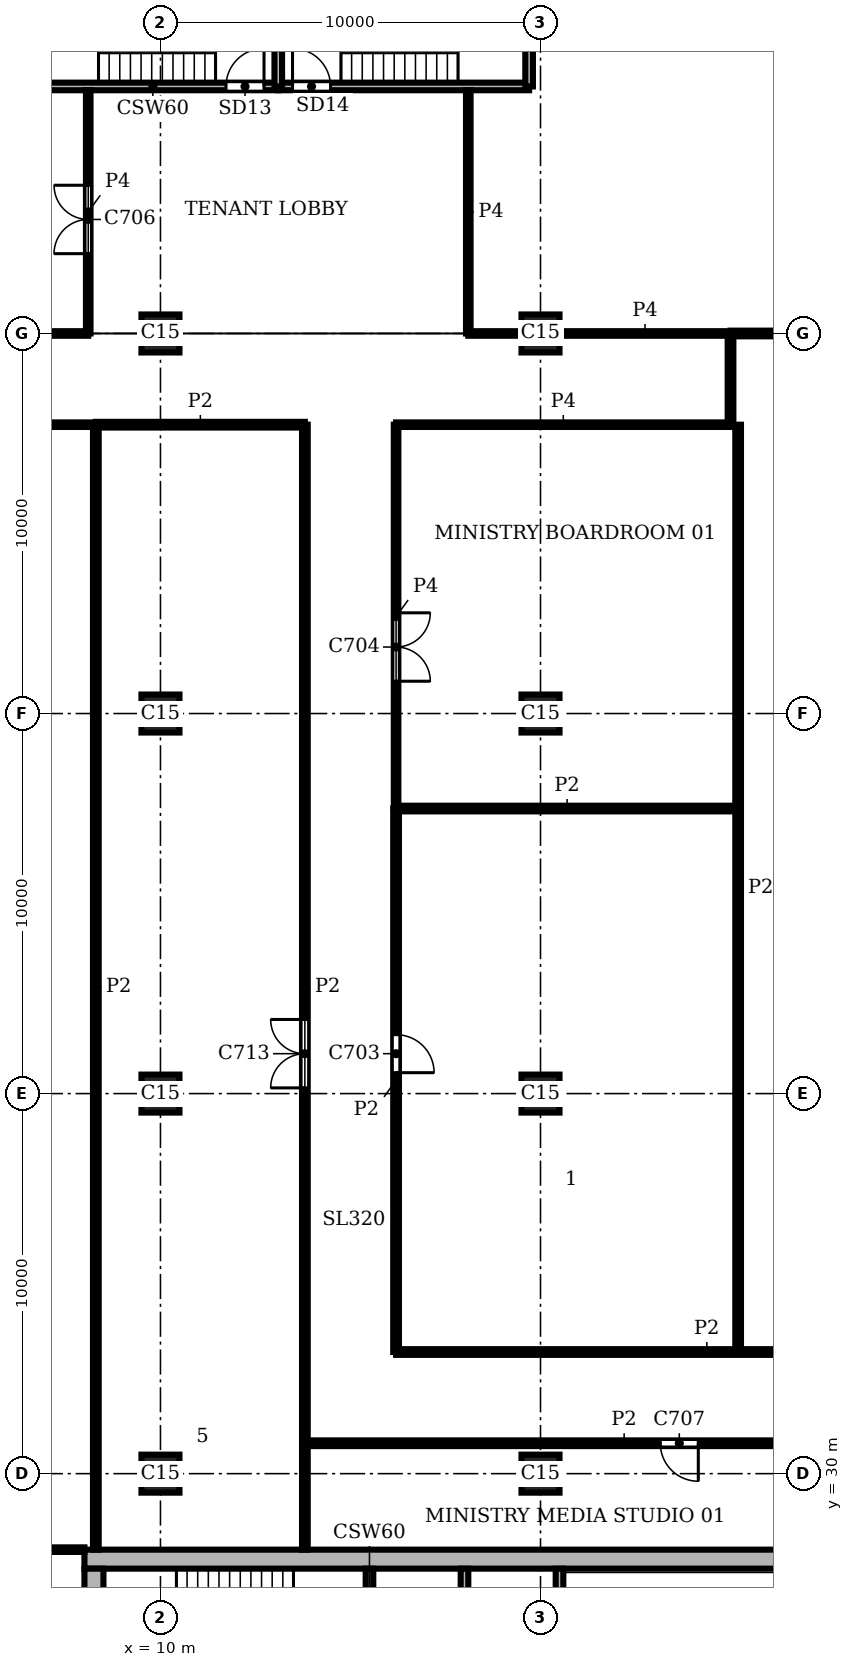
"""IFC4 building model, lengths in metres.
Left out: names, types, materials, properties, quantities, classifications, styles, units other than length and angle.
Written with IfcOpenShell. Run it as: python <this file> out.ifc"""

import sys

from ifc_helpers import new_model, si_unit, direction, frame, frame_2d, origin, origin_2d, place, context, subcontext, project, spatial, rectangle, extrude, element, fill, save


model = new_model("IFC4")
c1 = context("Model", 3, precision=1e-05, world=origin(), true_north=direction((0.0, 1.0)))
c2 = subcontext(c1, "Body", "Model", "MODEL_VIEW")
j1 = project(units=[si_unit("LENGTHUNIT", "METRE"), si_unit("PLANEANGLEUNIT", "RADIAN")], contexts=[c1])
p1 = place(None, origin())
s1 = spatial("IfcSite", under=j1, at=p1, CompositionType="ELEMENT")
p2 = place(p1, origin())
s2 = spatial("IfcBuilding", under=s1, at=p2, CompositionType="ELEMENT")
p3 = place(p2, frame((0.0, 0.0, 309.9)))
s3 = spatial("IfcBuildingStorey", under=s2, at=p3, CompositionType="ELEMENT", Elevation=309.9)
for number, where, z_axis, x_axis in (
    (1, (10.0, 30.0, 0.0), (0.0, 0.0, 1.0), (1.0, 0.0, 0.0)),
    (2, (10.0, 40.0, 0.0), (0.0, 0.0, 1.0), (1.0, 0.0, 0.0)),
    (3, (10.0, 50.0, 0.0), (0.0, 0.0, 1.0), (1.0, 0.0, 0.0)),
    (4, (10.0, 60.0, 0.0), (0.0, 0.0, 1.0), (1.0, 0.0, 0.0)),
    (5, (20.0, 30.0, 0.0), (0.0, 0.0, 1.0), (1.0, 0.0, 0.0)),
    (6, (20.0, 40.0, 0.0), (0.0, 0.0, 1.0), (1.0, 0.0, 0.0)),
    (7, (20.0, 50.0, 0.0), (0.0, 0.0, 1.0), (1.0, 0.0, 0.0)),
    (8, (20.0, 60.0, 0.0), (0.0, 0.0, 1.0), (1.0, 0.0, 0.0)),
):
    element("IfcColumn", number, at=place(p3, frame(where, z_axis=z_axis, x_axis=x_axis)), inside=s3, PredefinedType="COLUMN", context=c2, shape_type="SweptSolid", body=[
        extrude(rectangle(XDim=1.0, YDim=1.0, at=origin_2d()), origin(), (0.0, 0.0, 1.0), 3.9),
    ])
p4 = place(p3, frame((28.0, 27.75, 0.0), z_axis=(0.0, 0.0, 1.0), x_axis=(-1.0, 0.0, 0.0)))
e9 = element("IfcWall", 9, at=p4, inside=s3, PredefinedType="SHEAR", context=c2, shape_type="SweptSolid", body=[
    extrude(rectangle(XDim=20.0, YDim=0.5, at=frame_2d((10.0, 0.0))), origin(), (0.0, 0.0, 1.0), 3.9),
])
p5 = place(p3, frame((8.25, 27.5, 0.0), z_axis=(0.0, 0.0, 1.0), x_axis=(0.0, -1.0, 0.0)))
e10 = element("IfcWall", 10, at=p5, inside=s3, PredefinedType="SHEAR", context=c2, shape_type="SweptSolid", body=[
    extrude(rectangle(XDim=19.0, YDim=0.5, at=frame_2d((9.5, 0.0))), origin(), (0.0, 0.0, 1.0), 3.9),
])
p6 = place(p3, frame((6.5, 66.5, 0.0), z_axis=(0.0, 0.0, 1.0), x_axis=(1.0, 0.0, 0.0)))
e11 = element("IfcWall", 11, at=p6, inside=s3, PredefinedType="SHEAR", context=c2, shape_type="SweptSolid", body=[
    extrude(rectangle(XDim=6.6, YDim=0.2, at=frame_2d((3.3, 0.0))), origin(), (0.0, 0.0, 1.0), 3.58),
])
p7 = place(p6, frame((5.225, 0.0, 0.0)))
e12 = element("IfcOpeningElement", 12, at=p7, cuts=e11, PredefinedType="OPENING", context=c2, shape_type="SweptSolid", body=[
    extrude(rectangle(XDim=1.0, YDim=2.1, at=frame_2d((0.5, 1.05))), frame((0.0, 0.11, 0.0), z_axis=(0.0, -1.0, 0.0), x_axis=(1.0, 0.0, 0.0)), (0.0, 0.0, 1.0), 0.22),
])
p8 = place(p3, frame((13.1, 66.5, 0.0), z_axis=(0.0, 0.0, 1.0), x_axis=(1.0, 0.0, 0.0)))
e13 = element("IfcWall", 13, at=p8, inside=s3, PredefinedType="SHEAR", context=c2, shape_type="SweptSolid", body=[
    extrude(rectangle(XDim=6.6, YDim=0.2, at=frame_2d((3.3, 0.0))), origin(), (0.0, 0.0, 1.0), 3.58),
])
p9 = place(p8, frame((0.375, 0.0, 0.0)))
e14 = element("IfcOpeningElement", 14, at=p9, cuts=e13, PredefinedType="OPENING", context=c2, shape_type="SweptSolid", body=[
    extrude(rectangle(XDim=1.0, YDim=2.1, at=frame_2d((0.5, 1.05))), frame((0.0, 0.11, 0.0), z_axis=(0.0, -1.0, 0.0), x_axis=(1.0, 0.0, 0.0)), (0.0, 0.0, 1.0), 0.22),
])
p10 = place(p3, frame((13.1, 66.5, 0.0), z_axis=(0.0, 0.0, 1.0), x_axis=(0.0, 1.0, 0.0)))
e15 = element("IfcWall", 15, at=p10, inside=s3, PredefinedType="SHEAR", context=c2, shape_type="SweptSolid", body=[
    extrude(rectangle(XDim=3.3, YDim=0.2, at=frame_2d((1.65, 0.0))), origin(), (0.0, 0.0, 1.0), 3.58),
])
p11 = place(p3, frame((15.5, 23.6, 0.0), z_axis=(0.0, 0.0, 1.0), x_axis=(0.0, 1.0, 0.0)))
e16 = element("IfcWall", 16, at=p11, inside=s3, PredefinedType="SHEAR", context=c2, shape_type="SweptSolid", body=[
    extrude(rectangle(XDim=3.9, YDim=0.2, at=frame_2d((1.95, 0.0))), origin(), (0.0, 0.0, 1.0), 3.58),
])
p12 = place(p3, frame((18.0, 20.0, 0.0), z_axis=(0.0, 0.0, 1.0), x_axis=(0.0, 1.0, 0.0)))
e17 = element("IfcWall", 17, at=p12, inside=s3, PredefinedType="SHEAR", context=c2, shape_type="SweptSolid", body=[
    extrude(rectangle(XDim=7.5, YDim=0.2, at=frame_2d((3.75, 0.0))), origin(), (0.0, 0.0, 1.0), 3.58),
])
p13 = place(p12, frame((1.2, 0.0, 0.0)))
e18 = element("IfcOpeningElement", 18, at=p13, cuts=e17, PredefinedType="OPENING", context=c2, shape_type="SweptSolid", body=[
    extrude(rectangle(XDim=1.2, YDim=2.1, at=frame_2d((0.6, 1.05))), frame((0.0, 0.11, 0.0), z_axis=(0.0, -1.0, 0.0), x_axis=(1.0, 0.0, 0.0)), (0.0, 0.0, 1.0), 0.22),
])
p14 = place(p3, frame((19.7, 66.5, 0.0), z_axis=(0.0, 0.0, 1.0), x_axis=(0.0, 1.0, 0.0)))
e19 = element("IfcWall", 19, at=p14, inside=s3, PredefinedType="SHEAR", context=c2, shape_type="SweptSolid", body=[
    extrude(rectangle(XDim=3.3, YDim=0.2, at=frame_2d((1.65, 0.0))), origin(), (0.0, 0.0, 1.0), 3.58),
])
p15 = place(p3, frame((20.5, 23.6, 0.0), z_axis=(0.0, 0.0, 1.0), x_axis=(0.0, 1.0, 0.0)))
e20 = element("IfcWall", 20, at=p15, inside=s3, PredefinedType="SHEAR", context=c2, shape_type="SweptSolid", body=[
    extrude(rectangle(XDim=3.9, YDim=0.2, at=frame_2d((1.95, 0.0))), origin(), (0.0, 0.0, 1.0), 3.58),
])
p16 = place(p3, frame((8.3, 28.0, 0.0), z_axis=(0.0, 0.0, 1.0), x_axis=(0.0, 1.0, 0.0)))
e21 = element("IfcWall", 21, at=p16, inside=s3, PredefinedType="PARTITIONING", context=c2, shape_type="SweptSolid", body=[
    extrude(rectangle(XDim=29.6, YDim=0.15, at=frame_2d((14.8, 0.0))), origin(), (0.0, 0.0, 1.0), 3.58),
])
p17 = place(p3, frame((13.8, 28.0, 0.0), z_axis=(0.0, 0.0, 1.0), x_axis=(0.0, 1.0, 0.0)))
e22 = element("IfcWall", 22, at=p17, inside=s3, PredefinedType="PARTITIONING", context=c2, shape_type="SweptSolid", body=[
    extrude(rectangle(XDim=29.6, YDim=0.15, at=frame_2d((14.8, 0.0))), origin(), (0.0, 0.0, 1.0), 3.58),
])
p18 = place(p17, frame((12.15, 0.0, 0.0)))
e23 = element("IfcOpeningElement", 23, at=p18, cuts=e22, PredefinedType="OPENING", context=c2, shape_type="SweptSolid", body=[
    extrude(rectangle(XDim=1.8, YDim=2.1, at=frame_2d((0.9, 1.05))), frame((0.0, 0.085, 0.0), z_axis=(0.0, -1.0, 0.0), x_axis=(1.0, 0.0, 0.0)), (0.0, 0.0, 1.0), 0.17),
])
p19 = place(p3, frame((16.2, 33.2, 0.0), z_axis=(0.0, 0.0, 1.0), x_axis=(0.0, 1.0, 0.0)))
e24 = element("IfcWall", 24, at=p19, inside=s3, PredefinedType="PARTITIONING", context=c2, shape_type="SweptSolid", body=[
    extrude(rectangle(XDim=14.3, YDim=0.15, at=frame_2d((7.15, 0.0))), origin(), (0.0, 0.0, 1.0), 3.58),
])
p20 = place(p19, frame((7.35, 0.0, 0.0)))
e25 = element("IfcOpeningElement", 25, at=p20, cuts=e24, PredefinedType="OPENING", context=c2, shape_type="SweptSolid", body=[
    extrude(rectangle(XDim=1.0, YDim=2.1, at=frame_2d((0.5, 1.05))), frame((0.0, 0.085, 0.0), z_axis=(0.0, -1.0, 0.0), x_axis=(1.0, 0.0, 0.0)), (0.0, 0.0, 1.0), 0.17),
])
p21 = place(p3, frame((25.0, 57.6, 0.0), z_axis=(0.0, 0.0, 1.0), x_axis=(0.0, 1.0, 0.0)))
e26 = element("IfcWall", 26, at=p21, inside=s3, PredefinedType="PARTITIONING", context=c2, shape_type="SweptSolid", body=[
    extrude(rectangle(XDim=2.4, YDim=0.15, at=frame_2d((1.2, 0.0))), origin(), (0.0, 0.0, 1.0), 3.58),
])
p22 = place(p3, frame((25.2, 33.2, 0.0), z_axis=(0.0, 0.0, 1.0), x_axis=(0.0, 1.0, 0.0)))
e27 = element("IfcWall", 27, at=p22, inside=s3, PredefinedType="PARTITIONING", context=c2, shape_type="SweptSolid", body=[
    extrude(rectangle(XDim=24.4, YDim=0.15, at=frame_2d((12.2, 0.0))), origin(), (0.0, 0.0, 1.0), 3.58),
])
p23 = place(p3, frame((13.802, 30.8, 0.0), z_axis=(0.0, 0.0, 1.0), x_axis=(1.0, 0.0, 0.0)))
e28 = element("IfcWall", 28, at=p23, inside=s3, PredefinedType="PARTITIONING", context=c2, shape_type="SweptSolid", body=[
    extrude(rectangle(XDim=16.797, YDim=0.15, at=frame_2d((8.398, 0.0))), origin(), (0.0, 0.0, 1.0), 3.58),
])
p24 = place(p23, frame((9.35, 0.0, 0.0)))
e29 = element("IfcOpeningElement", 29, at=p24, cuts=e28, PredefinedType="OPENING", context=c2, shape_type="SweptSolid", body=[
    extrude(rectangle(XDim=1.0, YDim=2.1, at=frame_2d((0.5, 1.05))), frame((0.0, 0.085, 0.0), z_axis=(0.0, -1.0, 0.0), x_axis=(1.0, 0.0, 0.0)), (0.0, 0.0, 1.0), 0.17),
])
p25 = place(p3, frame((16.2, 33.2, 0.0), z_axis=(0.0, 0.0, 1.0), x_axis=(1.0, 0.0, 0.0)))
e30 = element("IfcWall", 30, at=p25, inside=s3, PredefinedType="PARTITIONING", context=c2, shape_type="SweptSolid", body=[
    extrude(rectangle(XDim=16.352, YDim=0.15, at=frame_2d((8.176, 0.0))), origin(), (0.0, 0.0, 1.0), 3.58),
])
p26 = place(p25, frame((10.85, 0.0, 0.0)))
e31 = element("IfcOpeningElement", 31, at=p26, cuts=e30, PredefinedType="OPENING", context=c2, shape_type="SweptSolid", body=[
    extrude(rectangle(XDim=1.0, YDim=2.1, at=frame_2d((0.5, 1.05))), frame((0.0, 0.085, 0.0), z_axis=(0.0, -1.0, 0.0), x_axis=(1.0, 0.0, 0.0)), (0.0, 0.0, 1.0), 0.17),
])
p27 = place(p3, frame((16.2, 47.5, 0.0), z_axis=(0.0, 0.0, 1.0), x_axis=(1.0, 0.0, 0.0)))
e32 = element("IfcWall", 32, at=p27, inside=s3, PredefinedType="PARTITIONING", context=c2, shape_type="SweptSolid", body=[
    extrude(rectangle(XDim=9.0, YDim=0.15, at=frame_2d((4.5, 0.0))), origin(), (0.0, 0.0, 1.0), 3.58),
])
p28 = place(p3, frame((8.3, 57.6, 0.0), z_axis=(0.0, 0.0, 1.0), x_axis=(1.0, 0.0, 0.0)))
e33 = element("IfcWall", 33, at=p28, inside=s3, PredefinedType="PARTITIONING", context=c2, shape_type="SweptSolid", body=[
    extrude(rectangle(XDim=5.5, YDim=0.15, at=frame_2d((2.75, 0.0))), origin(), (0.0, 0.0, 1.0), 3.58),
])
p29 = place(p3, frame((25.0, 60.0, 0.0), z_axis=(0.0, 0.0, 1.0), x_axis=(1.0, 0.0, 0.0)))
e34 = element("IfcWall", 34, at=p29, inside=s3, PredefinedType="PARTITIONING", context=c2, shape_type="SweptSolid", body=[
    extrude(rectangle(XDim=4.575, YDim=0.15, at=frame_2d((2.288, 0.0))), origin(), (0.0, 0.0, 1.0), 3.58),
])
p30 = place(p3, frame((8.1, 60.0, 0.0), z_axis=(0.0, 0.0, 1.0), x_axis=(0.0, 1.0, 0.0)))
e35 = element("IfcWall", 35, at=p30, inside=s3, PredefinedType="PARTITIONING", context=c2, shape_type="SweptSolid", body=[
    extrude(rectangle(XDim=6.4, YDim=0.12, at=frame_2d((3.2, 0.0))), origin(), (0.0, 0.0, 1.0), 3.58),
])
p31 = place(p30, frame((2.1, 0.0, 0.0)))
e36 = element("IfcOpeningElement", 36, at=p31, cuts=e35, PredefinedType="OPENING", context=c2, shape_type="SweptSolid", body=[
    extrude(rectangle(XDim=1.8, YDim=2.1, at=frame_2d((0.9, 1.05))), frame((0.0, 0.07, 0.0), z_axis=(0.0, -1.0, 0.0), x_axis=(1.0, 0.0, 0.0)), (0.0, 0.0, 1.0), 0.14),
])
p32 = place(p3, frame((16.2, 47.5, 0.0), z_axis=(0.0, 0.0, 1.0), x_axis=(0.0, 1.0, 0.0)))
e37 = element("IfcWall", 37, at=p32, inside=s3, PredefinedType="PARTITIONING", context=c2, shape_type="SweptSolid", body=[
    extrude(rectangle(XDim=10.1, YDim=0.12, at=frame_2d((5.05, 0.0))), origin(), (0.0, 0.0, 1.0), 3.58),
])
p33 = place(p32, frame((3.35, 0.0, 0.0)))
e38 = element("IfcOpeningElement", 38, at=p33, cuts=e37, PredefinedType="OPENING", context=c2, shape_type="SweptSolid", body=[
    extrude(rectangle(XDim=1.8, YDim=2.1, at=frame_2d((0.9, 1.05))), frame((0.0, 0.07, 0.0), z_axis=(0.0, -1.0, 0.0), x_axis=(1.0, 0.0, 0.0)), (0.0, 0.0, 1.0), 0.14),
])
p34 = place(p3, frame((18.1, 60.0, 0.0), z_axis=(0.0, 0.0, 1.0), x_axis=(0.0, 1.0, 0.0)))
e39 = element("IfcWall", 39, at=p34, inside=s3, PredefinedType="PARTITIONING", context=c2, shape_type="SweptSolid", body=[
    extrude(rectangle(XDim=6.4, YDim=0.12, at=frame_2d((3.2, 0.0))), origin(), (0.0, 0.0, 1.0), 3.58),
])
p35 = place(p3, frame((5.6, 28.0, 0.0), z_axis=(0.0, 0.0, 1.0), x_axis=(1.0, 0.0, 0.0)))
e40 = element("IfcWall", 40, at=p35, inside=s3, PredefinedType="PARTITIONING", context=c2, shape_type="SweptSolid", body=[
    extrude(rectangle(XDim=2.4, YDim=0.12, at=frame_2d((1.2, 0.0))), origin(), (0.0, 0.0, 1.0), 3.58),
])
p36 = place(p3, frame((5.0, 57.6, 0.0), z_axis=(0.0, 0.0, 1.0), x_axis=(1.0, 0.0, 0.0)))
e41 = element("IfcWall", 41, at=p36, inside=s3, PredefinedType="PARTITIONING", context=c2, shape_type="SweptSolid", body=[
    extrude(rectangle(XDim=3.3, YDim=0.12, at=frame_2d((1.65, 0.0))), origin(), (0.0, 0.0, 1.0), 3.58),
])
p37 = place(p3, frame((16.2, 57.6, 0.0), z_axis=(0.0, 0.0, 1.0), x_axis=(1.0, 0.0, 0.0)))
e42 = element("IfcWall", 42, at=p37, inside=s3, PredefinedType="PARTITIONING", context=c2, shape_type="SweptSolid", body=[
    extrude(rectangle(XDim=8.8, YDim=0.12, at=frame_2d((4.4, 0.0))), origin(), (0.0, 0.0, 1.0), 3.58),
])
p38 = place(p3, frame((5.0, 60.0, 0.0), z_axis=(0.0, 0.0, 1.0), x_axis=(1.0, 0.0, 0.0)))
e43 = element("IfcWall", 43, at=p38, inside=s3, PredefinedType="PARTITIONING", context=c2, shape_type="SweptSolid", body=[
    extrude(rectangle(XDim=3.1, YDim=0.12, at=frame_2d((1.55, 0.0))), origin(), (0.0, 0.0, 1.0), 3.58),
])
p39 = place(p3, frame((18.1, 60.0, 0.0), z_axis=(0.0, 0.0, 1.0), x_axis=(1.0, 0.0, 0.0)))
e44 = element("IfcWall", 44, at=p39, inside=s3, PredefinedType="PARTITIONING", context=c2, shape_type="SweptSolid", body=[
    extrude(rectangle(XDim=1.4, YDim=0.12, at=frame_2d((0.7, 0.0))), origin(), (0.0, 0.0, 1.0), 3.58),
])
p40 = place(p3, frame((20.5, 60.0, 0.0), z_axis=(0.0, 0.0, 1.0), x_axis=(1.0, 0.0, 0.0)))
e45 = element("IfcWall", 45, at=p40, inside=s3, PredefinedType="PARTITIONING", context=c2, shape_type="SweptSolid", body=[
    extrude(rectangle(XDim=4.5, YDim=0.12, at=frame_2d((2.25, 0.0))), origin(), (0.0, 0.0, 1.0), 3.58),
])
p41 = place(p7, origin())
e46 = element("IfcDoor", 46, at=p41, inside=s3, OperationType="SINGLE_SWING_RIGHT", PredefinedType="DOOR", context=c2, shape_type="SweptSolid", body=[
    extrude(rectangle(XDim=1.0, YDim=2.1, at=frame_2d((0.5, 1.05))), frame((0.0, 0.025, 0.0), z_axis=(0.0, -1.0, 0.0), x_axis=(1.0, 0.0, 0.0)), (0.0, 0.0, 1.0), 0.05),
])
fill(e12, e46)
p42 = place(p9, origin())
e47 = element("IfcDoor", 47, at=p42, inside=s3, OperationType="SINGLE_SWING_LEFT", PredefinedType="DOOR", context=c2, shape_type="SweptSolid", body=[
    extrude(rectangle(XDim=1.0, YDim=2.1, at=frame_2d((0.5, 1.05))), frame((0.0, 0.025, 0.0), z_axis=(0.0, -1.0, 0.0), x_axis=(1.0, 0.0, 0.0)), (0.0, 0.0, 1.0), 0.05),
])
fill(e14, e47)
p43 = place(p20, frame((1.0, 0.0, 0.0), z_axis=(0.0, 0.0, 1.0), x_axis=(-1.0, 0.0, 0.0)))
e48 = element("IfcDoor", 48, at=p43, inside=s3, OperationType="SINGLE_SWING_RIGHT", PredefinedType="DOOR", context=c2, shape_type="SweptSolid", body=[
    extrude(rectangle(XDim=1.0, YDim=2.1, at=frame_2d((0.5, 1.05))), frame((0.0, 0.025, 0.0), z_axis=(0.0, -1.0, 0.0), x_axis=(1.0, 0.0, 0.0)), (0.0, 0.0, 1.0), 0.05),
])
fill(e25, e48)
p44 = place(p33, frame((1.8, 0.0, 0.0), z_axis=(0.0, 0.0, 1.0), x_axis=(-1.0, 0.0, 0.0)))
e49 = element("IfcDoor", 49, at=p44, inside=s3, OperationType="DOUBLE_DOOR_SINGLE_SWING", PredefinedType="DOOR", context=c2, shape_type="SweptSolid", body=[
    extrude(rectangle(XDim=1.8, YDim=2.1, at=frame_2d((0.9, 1.05))), frame((0.0, 0.025, 0.0), z_axis=(0.0, -1.0, 0.0), x_axis=(1.0, 0.0, 0.0)), (0.0, 0.0, 1.0), 0.05),
])
fill(e38, e49)
p45 = place(p31, origin())
e50 = element("IfcDoor", 50, at=p45, inside=s3, OperationType="DOUBLE_DOOR_SINGLE_SWING", PredefinedType="DOOR", context=c2, shape_type="SweptSolid", body=[
    extrude(rectangle(XDim=1.8, YDim=2.1, at=frame_2d((0.9, 1.05))), frame((0.0, 0.025, 0.0), z_axis=(0.0, -1.0, 0.0), x_axis=(1.0, 0.0, 0.0)), (0.0, 0.0, 1.0), 0.05),
])
fill(e36, e50)
p46 = place(p24, frame((1.0, 0.0, 0.0), z_axis=(0.0, 0.0, 1.0), x_axis=(-1.0, 0.0, 0.0)))
e51 = element("IfcDoor", 51, at=p46, inside=s3, OperationType="SINGLE_SWING_LEFT", PredefinedType="DOOR", context=c2, shape_type="SweptSolid", body=[
    extrude(rectangle(XDim=1.0, YDim=2.1, at=frame_2d((0.5, 1.05))), frame((0.0, 0.025, 0.0), z_axis=(0.0, -1.0, 0.0), x_axis=(1.0, 0.0, 0.0)), (0.0, 0.0, 1.0), 0.05),
])
fill(e29, e51)
p47 = place(p18, origin())
e52 = element("IfcDoor", 52, at=p47, inside=s3, OperationType="DOUBLE_DOOR_SINGLE_SWING", PredefinedType="DOOR", context=c2, shape_type="SweptSolid", body=[
    extrude(rectangle(XDim=1.8, YDim=2.1, at=frame_2d((0.9, 1.05))), frame((0.0, 0.025, 0.0), z_axis=(0.0, -1.0, 0.0), x_axis=(1.0, 0.0, 0.0)), (0.0, 0.0, 1.0), 0.05),
])
fill(e23, e52)
save(model, sys.argv[1])
